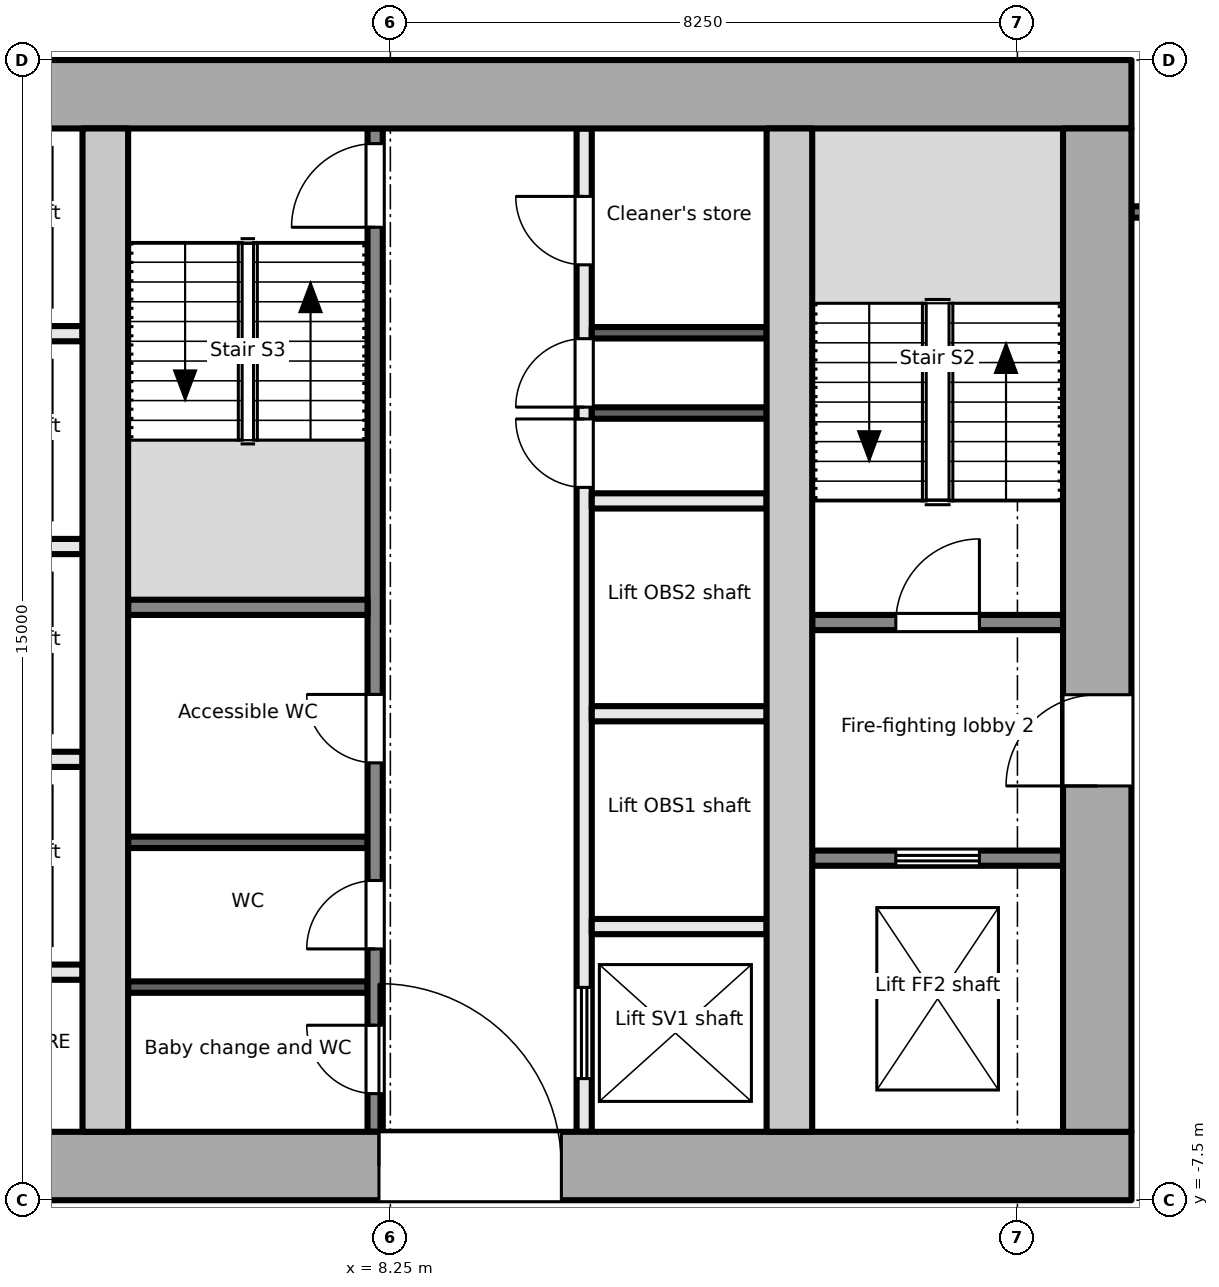
"""IFC4 building model, lengths in metres.
Left out: names, types, materials, properties, quantities, classifications, styles, units other than length and angle.
Written with IfcOpenShell. Run it as: python <this file> out.ifc"""

import sys

from ifc_helpers import new_model, si_unit, direction, frame, frame_2d, origin, place, context, subcontext, project, spatial, rectangle, extrude, element, fill, save


model = new_model("IFC4")
c1 = context("Model", 3, precision=1e-05, world=origin(), true_north=direction((0.0, 1.0)))
c2 = subcontext(c1, "Body", "Model", "MODEL_VIEW")
j1 = project(units=[si_unit("LENGTHUNIT", "METRE"), si_unit("PLANEANGLEUNIT", "RADIAN")], contexts=[c1])
p1 = place(None, origin())
s1 = spatial("IfcSite", under=j1, at=p1, CompositionType="ELEMENT")
p2 = place(p1, origin())
s2 = spatial("IfcBuilding", under=s1, at=p2, CompositionType="ELEMENT")
p3 = place(p2, frame((0.0, 0.0, 195.8)))
s3 = spatial("IfcBuildingStorey", under=s2, at=p3, CompositionType="ELEMENT", Elevation=195.8)
p4 = place(p3, frame((-18.0, -7.05, -0.2), z_axis=(0.0, 0.0, 1.0), x_axis=(1.0, 0.0, 0.0)))
e1 = element("IfcWall", 1, at=p4, inside=s3, PredefinedType="SHEAR", context=c2, shape_type="SweptSolid", body=[
    extrude(rectangle(XDim=36.0, YDim=0.9, at=frame_2d((18.0, 0.0))), origin(), (0.0, 0.0, 1.0), 3.9),
])
p5 = place(p4, frame((8.1, 0.0, 0.2)))
e2 = element("IfcOpeningElement", 2, at=p5, cuts=e1, PredefinedType="OPENING", context=c2, shape_type="SweptSolid", body=[
    extrude(rectangle(XDim=1.8, YDim=2.1, at=frame_2d((0.9, 1.05))), frame((0.0, 0.46, 0.0), z_axis=(0.0, -1.0, 0.0), x_axis=(1.0, 0.0, 0.0)), (0.0, 0.0, 1.0), 0.921),
])
p6 = place(p4, frame((16.8, 0.0, 0.2)))
e3 = element("IfcOpeningElement", 3, at=p6, cuts=e1, PredefinedType="OPENING", context=c2, shape_type="SweptSolid", body=[
    extrude(rectangle(XDim=2.4, YDim=2.1, at=frame_2d((1.2, 1.05))), frame((0.0, 0.46, 0.0), z_axis=(0.0, -1.0, 0.0), x_axis=(1.0, 0.0, 0.0)), (0.0, 0.0, 1.0), 0.921),
])
p7 = place(p4, frame((26.1, 0.0, 0.2)))
e4 = element("IfcOpeningElement", 4, at=p7, cuts=e1, PredefinedType="OPENING", context=c2, shape_type="SweptSolid", body=[
    extrude(rectangle(XDim=2.4, YDim=2.1, at=frame_2d((1.2, 1.05))), frame((0.0, 0.46, 0.0), z_axis=(0.0, -1.0, 0.0), x_axis=(1.0, 0.0, 0.0)), (0.0, 0.0, 1.0), 0.921),
])
p8 = place(p3, frame((-18.0, 7.05, -0.2), z_axis=(0.0, 0.0, 1.0), x_axis=(1.0, 0.0, 0.0)))
e5 = element("IfcWall", 5, at=p8, inside=s3, PredefinedType="SHEAR", context=c2, shape_type="SweptSolid", body=[
    extrude(rectangle(XDim=36.0, YDim=0.9, at=frame_2d((18.0, 0.0))), origin(), (0.0, 0.0, 1.0), 3.9),
])
p9 = place(p3, frame((17.55, -6.6, -0.2), z_axis=(0.0, 0.0, 1.0), x_axis=(0.0, 1.0, 0.0)))
e6 = element("IfcWall", 6, at=p9, inside=s3, PredefinedType="SHEAR", context=c2, shape_type="SweptSolid", body=[
    extrude(rectangle(XDim=13.2, YDim=0.9, at=frame_2d((6.6, 0.0))), origin(), (0.0, 0.0, 1.0), 3.9),
])
p10 = place(p9, frame((4.55, 0.0, 0.2)))
e7 = element("IfcOpeningElement", 7, at=p10, cuts=e6, PredefinedType="OPENING", context=c2, shape_type="SweptSolid", body=[
    extrude(rectangle(XDim=1.2, YDim=2.1, at=frame_2d((0.6, 1.05))), frame((0.0, 0.46, 0.0), z_axis=(0.0, -1.0, 0.0), x_axis=(1.0, 0.0, 0.0)), (0.0, 0.0, 1.0), 0.921),
])
for number, where, z_axis, x_axis in (
    (8, (4.5, -6.6, -0.2), (0.0, 0.0, 1.0), (0.0, 1.0, 0.0)),
    (9, (13.5, -6.6, -0.2), (0.0, 0.0, 1.0), (0.0, 1.0, 0.0)),
):
    element("IfcWall", number, at=place(p3, frame(where, z_axis=z_axis, x_axis=x_axis)), inside=s3, PredefinedType="SHEAR", context=c2, shape_type="SweptSolid", body=[
        extrude(rectangle(XDim=13.2, YDim=0.6, at=frame_2d((6.6, 0.0))), origin(), (0.0, 0.0, 1.0), 3.9),
    ])
p11 = place(p3, frame((13.8, -3.0, 0.0), z_axis=(0.0, 0.0, 1.0), x_axis=(1.0, 0.0, 0.0)))
e10 = element("IfcWall", 10, at=p11, inside=s3, PredefinedType="PARTITIONING", context=c2, shape_type="SweptSolid", body=[
    extrude(rectangle(XDim=3.3, YDim=0.2, at=frame_2d((1.65, 0.0))), origin(), (0.0, 0.0, 1.0), 3.7),
])
p12 = place(p11, frame((1.1, 0.0, 0.0)))
e11 = element("IfcOpeningElement", 11, at=p12, cuts=e10, PredefinedType="OPENING", context=c2, shape_type="SweptSolid", body=[
    extrude(rectangle(XDim=1.1, YDim=2.1, at=frame_2d((0.55, 1.05))), frame((0.0, 0.111, 0.0), z_axis=(0.0, -1.0, 0.0), x_axis=(1.0, 0.0, 0.0)), (0.0, 0.0, 1.0), 0.221),
])
p13 = place(p3, frame((13.8, 0.1, 0.0), z_axis=(0.0, 0.0, 1.0), x_axis=(1.0, 0.0, 0.0)))
e12 = element("IfcWall", 12, at=p13, inside=s3, PredefinedType="PARTITIONING", context=c2, shape_type="SweptSolid", body=[
    extrude(rectangle(XDim=3.3, YDim=0.2, at=frame_2d((1.65, 0.0))), origin(), (0.0, 0.0, 1.0), 3.7),
])
p14 = place(p13, frame((1.1, 0.0, 0.0)))
e13 = element("IfcOpeningElement", 13, at=p14, cuts=e12, PredefinedType="OPENING", context=c2, shape_type="SweptSolid", body=[
    extrude(rectangle(XDim=1.1, YDim=2.1, at=frame_2d((0.55, 1.05))), frame((0.0, 0.111, 0.0), z_axis=(0.0, -1.0, 0.0), x_axis=(1.0, 0.0, 0.0)), (0.0, 0.0, 1.0), 0.221),
])
for number, where, z_axis, x_axis in (
    (14, (1.9, -1.7, 0.0), (0.0, 0.0, 1.0), (1.0, 0.0, 0.0)),
    (15, (1.9, 1.1, 0.0), (0.0, 0.0, 1.0), (1.0, 0.0, 0.0)),
    (16, (1.9, 3.9, 0.0), (0.0, 0.0, 1.0), (1.0, 0.0, 0.0)),
    (17, (1.9, -4.5, 0.0), (0.0, 0.0, 1.0), (1.0, 0.0, 0.0)),
):
    element("IfcWall", number, at=place(p3, frame(where, z_axis=z_axis, x_axis=x_axis)), inside=s3, PredefinedType="PARTITIONING", context=c2, shape_type="SweptSolid", body=[
        extrude(rectangle(XDim=2.3, YDim=0.2, at=frame_2d((1.15, 0.0))), origin(), (0.0, 0.0, 1.0), 3.7),
    ])
p15 = place(p3, frame((8.05, -6.6, 0.0), z_axis=(0.0, 0.0, 1.0), x_axis=(0.0, 1.0, 0.0)))
e18 = element("IfcWall", 18, at=p15, inside=s3, PredefinedType="PARTITIONING", context=c2, shape_type="SweptSolid", body=[
    extrude(rectangle(XDim=13.2, YDim=0.2, at=frame_2d((6.6, 0.0))), origin(), (0.0, 0.0, 1.0), 3.7),
])
p16 = place(p15, frame((0.502, 0.0, 0.0)))
e19 = element("IfcOpeningElement", 19, at=p16, cuts=e18, PredefinedType="OPENING", context=c2, shape_type="SweptSolid", body=[
    extrude(rectangle(XDim=0.9, YDim=2.1, at=frame_2d((0.45, 1.05))), frame((0.0, 0.111, 0.0), z_axis=(0.0, -1.0, 0.0), x_axis=(1.0, 0.0, 0.0)), (0.0, 0.0, 1.0), 0.221),
])
p17 = place(p15, frame((2.406, 0.0, 0.0)))
e20 = element("IfcOpeningElement", 20, at=p17, cuts=e18, PredefinedType="OPENING", context=c2, shape_type="SweptSolid", body=[
    extrude(rectangle(XDim=0.9, YDim=2.1, at=frame_2d((0.45, 1.05))), frame((0.0, 0.111, 0.0), z_axis=(0.0, -1.0, 0.0), x_axis=(1.0, 0.0, 0.0)), (0.0, 0.0, 1.0), 0.221),
])
p18 = place(p15, frame((4.854, 0.0, 0.0)))
e21 = element("IfcOpeningElement", 21, at=p18, cuts=e18, PredefinedType="OPENING", context=c2, shape_type="SweptSolid", body=[
    extrude(rectangle(XDim=0.9, YDim=2.1, at=frame_2d((0.45, 1.05))), frame((0.0, 0.111, 0.0), z_axis=(0.0, -1.0, 0.0), x_axis=(1.0, 0.0, 0.0)), (0.0, 0.0, 1.0), 0.221),
])
p19 = place(p15, frame((11.9, 0.0, 0.0)))
e22 = element("IfcOpeningElement", 22, at=p19, cuts=e18, PredefinedType="OPENING", context=c2, shape_type="SweptSolid", body=[
    extrude(rectangle(XDim=1.1, YDim=2.1, at=frame_2d((0.55, 1.05))), frame((0.0, 0.111, 0.0), z_axis=(0.0, -1.0, 0.0), x_axis=(1.0, 0.0, 0.0)), (0.0, 0.0, 1.0), 0.221),
])
p20 = place(p3, frame((10.8, -6.6, 0.0), z_axis=(0.0, 0.0, 1.0), x_axis=(0.0, 1.0, 0.0)))
e23 = element("IfcWall", 23, at=p20, inside=s3, PredefinedType="PARTITIONING", context=c2, shape_type="SweptSolid", body=[
    extrude(rectangle(XDim=13.2, YDim=0.2, at=frame_2d((6.6, 0.0))), origin(), (0.0, 0.0, 1.0), 3.7),
])
p21 = place(p20, frame((0.7, 0.0, 0.0)))
e24 = element("IfcOpeningElement", 24, at=p21, cuts=e23, PredefinedType="OPENING", context=c2, shape_type="SweptSolid", body=[
    extrude(rectangle(XDim=1.2, YDim=2.1, at=frame_2d((0.6, 1.05))), frame((0.0, 0.111, 0.0), z_axis=(0.0, -1.0, 0.0), x_axis=(1.0, 0.0, 0.0)), (0.0, 0.0, 1.0), 0.221),
])
p22 = place(p20, frame((8.478, 0.0, 0.0)))
e25 = element("IfcOpeningElement", 25, at=p22, cuts=e23, PredefinedType="OPENING", context=c2, shape_type="SweptSolid", body=[
    extrude(rectangle(XDim=0.9, YDim=2.1, at=frame_2d((0.45, 1.05))), frame((0.0, 0.111, 0.0), z_axis=(0.0, -1.0, 0.0), x_axis=(1.0, 0.0, 0.0)), (0.0, 0.0, 1.0), 0.221),
])
p23 = place(p20, frame((9.534, 0.0, 0.0)))
e26 = element("IfcOpeningElement", 26, at=p23, cuts=e23, PredefinedType="OPENING", context=c2, shape_type="SweptSolid", body=[
    extrude(rectangle(XDim=0.9, YDim=2.1, at=frame_2d((0.45, 1.05))), frame((0.0, 0.111, 0.0), z_axis=(0.0, -1.0, 0.0), x_axis=(1.0, 0.0, 0.0)), (0.0, 0.0, 1.0), 0.221),
])
p24 = place(p20, frame((11.406, 0.0, 0.0)))
e27 = element("IfcOpeningElement", 27, at=p24, cuts=e23, PredefinedType="OPENING", context=c2, shape_type="SweptSolid", body=[
    extrude(rectangle(XDim=0.9, YDim=2.1, at=frame_2d((0.45, 1.05))), frame((0.0, 0.111, 0.0), z_axis=(0.0, -1.0, 0.0), x_axis=(1.0, 0.0, 0.0)), (0.0, 0.0, 1.0), 0.221),
])
p25 = place(p3, frame((4.8, 0.3, 0.0), z_axis=(0.0, 0.0, 1.0), x_axis=(1.0, 0.0, 0.0)))
e28 = element("IfcWall", 28, at=p25, inside=s3, PredefinedType="PARTITIONING", context=c2, shape_type="SweptSolid", body=[
    extrude(rectangle(XDim=3.15, YDim=0.2, at=frame_2d((1.575, 0.0))), origin(), (0.0, 0.0, 1.0), 3.7),
])
for number, where, z_axis, x_axis in (
    (29, (4.8, -4.696, 0.0), (0.0, 0.0, 1.0), (1.0, 0.0, 0.0)),
    (30, (4.8, -2.792, 0.0), (0.0, 0.0, 1.0), (1.0, 0.0, 0.0)),
):
    element("IfcWall", number, at=place(p3, frame(where, z_axis=z_axis, x_axis=x_axis)), inside=s3, PredefinedType="PARTITIONING", context=c2, shape_type="SweptSolid", body=[
        extrude(rectangle(XDim=3.15, YDim=0.15, at=frame_2d((1.575, 0.0))), origin(), (0.0, 0.0, 1.0), 3.7),
    ])
for number, where, z_axis, x_axis in (
    (31, (10.9, -3.9, 0.0), (0.0, 0.0, 1.0), (1.0, 0.0, 0.0)),
    (32, (10.9, -1.1, 0.0), (0.0, 0.0, 1.0), (1.0, 0.0, 0.0)),
    (33, (10.9, 1.7, 0.0), (0.0, 0.0, 1.0), (1.0, 0.0, 0.0)),
):
    element("IfcWall", number, at=place(p3, frame(where, z_axis=z_axis, x_axis=x_axis)), inside=s3, PredefinedType="PARTITIONING", context=c2, shape_type="SweptSolid", body=[
        extrude(rectangle(XDim=2.3, YDim=0.2, at=frame_2d((1.15, 0.0))), origin(), (0.0, 0.0, 1.0), 3.7),
    ])
for number, where, z_axis, x_axis in (
    (34, (10.9, 2.856, 0.0), (0.0, 0.0, 1.0), (1.0, 0.0, 0.0)),
    (35, (10.9, 3.912, 0.0), (0.0, 0.0, 1.0), (1.0, 0.0, 0.0)),
):
    element("IfcWall", number, at=place(p3, frame(where, z_axis=z_axis, x_axis=x_axis)), inside=s3, PredefinedType="PARTITIONING", context=c2, shape_type="SweptSolid", body=[
        extrude(rectangle(XDim=2.3, YDim=0.15, at=frame_2d((1.15, 0.0))), origin(), (0.0, 0.0, 1.0), 3.7),
    ])
p26 = place(p3, frame((18.0, 5.501, 0.0), z_axis=(0.0, 0.0, 1.0), x_axis=(1.0, 0.0, 0.0)))
e36 = element("IfcWall", 36, at=p26, inside=s3, PredefinedType="PARTITIONING", context=c2, shape_type="SweptSolid", body=[
    extrude(rectangle(XDim=2.325, YDim=0.15, at=frame_2d((1.163, 0.0))), origin(), (0.0, 0.0, 1.0), 3.7),
])
p27 = place(p26, frame((0.268, 0.0, 0.0)))
e37 = element("IfcOpeningElement", 37, at=p27, cuts=e36, PredefinedType="OPENING", context=c2, shape_type="SweptSolid", body=[
    extrude(rectangle(XDim=1.8, YDim=2.1, at=frame_2d((0.9, 1.05))), frame((0.0, 0.085, 0.0), z_axis=(0.0, -1.0, 0.0), x_axis=(1.0, 0.0, 0.0)), (0.0, 0.0, 1.0), 0.171),
])
p28 = place(p12, origin())
e38 = element("IfcDoor", 38, at=p28, inside=s3, OperationType="DOUBLE_DOOR_SLIDING", PredefinedType="DOOR", context=c2, shape_type="SweptSolid", body=[
    extrude(rectangle(XDim=1.1, YDim=2.1, at=frame_2d((0.55, 1.05))), frame((0.0, 0.025, 0.0), z_axis=(0.0, -1.0, 0.0), x_axis=(1.0, 0.0, 0.0)), (0.0, 0.0, 1.0), 0.05),
])
fill(e11, e38)
p29 = place(p10, origin())
e39 = element("IfcDoor", 39, at=p29, inside=s3, OperationType="SINGLE_SWING_LEFT", PredefinedType="DOOR", context=c2, shape_type="SweptSolid", body=[
    extrude(rectangle(XDim=1.2, YDim=2.1, at=frame_2d((0.6, 1.05))), frame((0.0, 0.025, 0.0), z_axis=(0.0, -1.0, 0.0), x_axis=(1.0, 0.0, 0.0)), (0.0, 0.0, 1.0), 0.05),
])
fill(e7, e39)
p30 = place(p14, origin())
e40 = element("IfcDoor", 40, at=p30, inside=s3, OperationType="SINGLE_SWING_RIGHT", PredefinedType="DOOR", context=c2, shape_type="SweptSolid", body=[
    extrude(rectangle(XDim=1.1, YDim=2.1, at=frame_2d((0.55, 1.05))), frame((0.0, 0.025, 0.0), z_axis=(0.0, -1.0, 0.0), x_axis=(1.0, 0.0, 0.0)), (0.0, 0.0, 1.0), 0.05),
])
fill(e13, e40)
p31 = place(p16, origin())
e41 = element("IfcDoor", 41, at=p31, inside=s3, OperationType="SINGLE_SWING_RIGHT", PredefinedType="DOOR", context=c2, shape_type="SweptSolid", body=[
    extrude(rectangle(XDim=0.9, YDim=2.1, at=frame_2d((0.45, 1.05))), frame((0.0, 0.025, 0.0), z_axis=(0.0, -1.0, 0.0), x_axis=(1.0, 0.0, 0.0)), (0.0, 0.0, 1.0), 0.05),
])
fill(e19, e41)
p32 = place(p17, origin())
e42 = element("IfcDoor", 42, at=p32, inside=s3, OperationType="SINGLE_SWING_LEFT", PredefinedType="DOOR", context=c2, shape_type="SweptSolid", body=[
    extrude(rectangle(XDim=0.9, YDim=2.1, at=frame_2d((0.45, 1.05))), frame((0.0, 0.025, 0.0), z_axis=(0.0, -1.0, 0.0), x_axis=(1.0, 0.0, 0.0)), (0.0, 0.0, 1.0), 0.05),
])
fill(e20, e42)
p33 = place(p18, origin())
e43 = element("IfcDoor", 43, at=p33, inside=s3, OperationType="SINGLE_SWING_RIGHT", PredefinedType="DOOR", context=c2, shape_type="SweptSolid", body=[
    extrude(rectangle(XDim=0.9, YDim=2.1, at=frame_2d((0.45, 1.05))), frame((0.0, 0.025, 0.0), z_axis=(0.0, -1.0, 0.0), x_axis=(1.0, 0.0, 0.0)), (0.0, 0.0, 1.0), 0.05),
])
fill(e21, e43)
p34 = place(p19, origin())
e44 = element("IfcDoor", 44, at=p34, inside=s3, OperationType="SINGLE_SWING_LEFT", PredefinedType="DOOR", context=c2, shape_type="SweptSolid", body=[
    extrude(rectangle(XDim=1.1, YDim=2.1, at=frame_2d((0.55, 1.05))), frame((0.0, 0.025, 0.0), z_axis=(0.0, -1.0, 0.0), x_axis=(1.0, 0.0, 0.0)), (0.0, 0.0, 1.0), 0.05),
])
fill(e22, e44)
p35 = place(p7, origin())
e45 = element("IfcDoor", 45, at=p35, inside=s3, OperationType="DOUBLE_DOOR_DOUBLE_SWING", PredefinedType="DOOR", context=c2, shape_type="SweptSolid", body=[
    extrude(rectangle(XDim=2.4, YDim=2.1, at=frame_2d((1.2, 1.05))), frame((0.0, 0.025, 0.0), z_axis=(0.0, -1.0, 0.0), x_axis=(1.0, 0.0, 0.0)), (0.0, 0.0, 1.0), 0.05),
])
fill(e4, e45)
p36 = place(p21, origin())
e46 = element("IfcDoor", 46, at=p36, inside=s3, OperationType="DOUBLE_DOOR_SLIDING", PredefinedType="DOOR", context=c2, shape_type="SweptSolid", body=[
    extrude(rectangle(XDim=1.2, YDim=2.1, at=frame_2d((0.6, 1.05))), frame((0.0, 0.025, 0.0), z_axis=(0.0, -1.0, 0.0), x_axis=(1.0, 0.0, 0.0)), (0.0, 0.0, 1.0), 0.05),
])
fill(e24, e46)
p37 = place(p22, origin())
e47 = element("IfcDoor", 47, at=p37, inside=s3, OperationType="SINGLE_SWING_RIGHT", PredefinedType="DOOR", context=c2, shape_type="SweptSolid", body=[
    extrude(rectangle(XDim=0.9, YDim=2.1, at=frame_2d((0.45, 1.05))), frame((0.0, 0.025, 0.0), z_axis=(0.0, -1.0, 0.0), x_axis=(1.0, 0.0, 0.0)), (0.0, 0.0, 1.0), 0.05),
])
fill(e25, e47)
p38 = place(p23, origin())
e48 = element("IfcDoor", 48, at=p38, inside=s3, OperationType="SINGLE_SWING_LEFT", PredefinedType="DOOR", context=c2, shape_type="SweptSolid", body=[
    extrude(rectangle(XDim=0.9, YDim=2.1, at=frame_2d((0.45, 1.05))), frame((0.0, 0.025, 0.0), z_axis=(0.0, -1.0, 0.0), x_axis=(1.0, 0.0, 0.0)), (0.0, 0.0, 1.0), 0.05),
])
fill(e26, e48)
p39 = place(p24, origin())
e49 = element("IfcDoor", 49, at=p39, inside=s3, OperationType="SINGLE_SWING_RIGHT", PredefinedType="DOOR", context=c2, shape_type="SweptSolid", body=[
    extrude(rectangle(XDim=0.9, YDim=2.1, at=frame_2d((0.45, 1.05))), frame((0.0, 0.025, 0.0), z_axis=(0.0, -1.0, 0.0), x_axis=(1.0, 0.0, 0.0)), (0.0, 0.0, 1.0), 0.05),
])
fill(e27, e49)
save(model, sys.argv[1])
